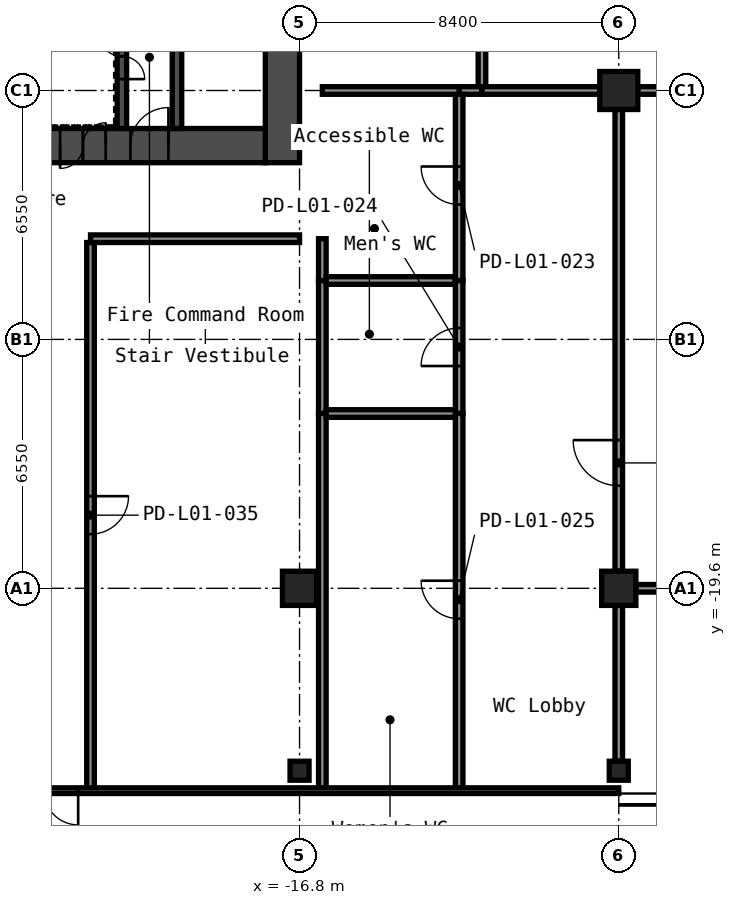
"""IFC4 building model, lengths in metres.
Left out: names, types, materials, properties, quantities, classifications, styles, units other than length and angle.
Written with IfcOpenShell. Run it as: python <this file> out.ifc"""

import sys

from ifc_helpers import new_model, si_unit, direction, frame, frame_2d, origin, origin_2d, place, context, subcontext, project, spatial, rectangle, hollow_rectangle, extrude, element, fill, save


model = new_model("IFC4")
c1 = context("Model", 3, precision=1e-05, world=origin(), true_north=direction((0.0, 1.0)))
c2 = subcontext(c1, "Body", "Model", "MODEL_VIEW")
j1 = project(units=[si_unit("LENGTHUNIT", "METRE"), si_unit("PLANEANGLEUNIT", "RADIAN")], contexts=[c1])
p1 = place(None, origin())
s1 = spatial("IfcSite", under=j1, at=p1, CompositionType="ELEMENT")
p2 = place(p1, origin())
s2 = spatial("IfcBuilding", under=s1, at=p2, CompositionType="ELEMENT")
p3 = place(p2, origin())
s3 = spatial("IfcBuildingStorey", under=s2, at=p3, CompositionType="ELEMENT", Elevation=0.0)
for number, where, z_axis, x_axis in (
    (1, (-16.8, -19.6, -0.3), (0.0, 0.0, 1.0), (1.0, 0.0, 0.0)),
    (2, (-8.4, -19.6, -0.3), (0.0, 0.0, 1.0), (1.0, 0.0, 0.0)),
):
    element("IfcColumn", number, at=place(p3, frame(where, z_axis=z_axis, x_axis=x_axis)), inside=s3, PredefinedType="COLUMN", context=c2, shape_type="SweptSolid", body=[
        extrude(hollow_rectangle(XDim=0.9, YDim=0.9, WallThickness=0.036, at=origin_2d()), origin(), (0.0, 0.0, 1.0), 8.9),
    ])
p4 = place(p3, frame((-8.4, -6.5, -0.3), z_axis=(0.0, 0.0, 1.0), x_axis=(1.0, 0.0, 0.0)))
e3 = element("IfcColumn", 3, at=p4, inside=s3, PredefinedType="COLUMN", context=c2, shape_type="SweptSolid", body=[
    extrude(hollow_rectangle(XDim=1.0, YDim=1.0, WallThickness=0.04, at=origin_2d()), origin(), (0.0, 0.0, 1.0), 8.9),
])
for number, where, z_axis, x_axis in (
    (4, (-16.8, -24.4, -0.3), (0.0, 0.0, 1.0), (1.0, 0.0, 0.0)),
    (5, (-8.4, -24.4, -0.3), (0.0, 0.0, 1.0), (1.0, 0.0, 0.0)),
):
    element("IfcColumn", number, at=place(p3, frame(where, z_axis=z_axis, x_axis=x_axis)), inside=s3, PredefinedType="COLUMN", context=c2, shape_type="SweptSolid", body=[
        extrude(hollow_rectangle(XDim=0.5, YDim=0.5, WallThickness=0.019, InnerFilletRadius=0.029, OuterFilletRadius=0.048, at=origin_2d()), origin(), (0.0, 0.0, 1.0), 8.9),
    ])
p5 = place(p3, frame((-17.25, -8.4, 0.0), z_axis=(0.0, 0.0, 1.0), x_axis=(0.0, 1.0, 0.0)))
e6 = element("IfcWall", 6, at=p5, inside=s3, PredefinedType="SHEAR", context=c2, shape_type="SweptSolid", body=[
    extrude(rectangle(XDim=16.8, YDim=0.9, at=frame_2d((8.4, 0.0))), origin(), (0.0, 0.0, 1.0), 8.6),
])
p6 = place(p5, frame((3.4, 0.0, 0.0)))
e7 = element("IfcOpeningElement", 7, at=p6, cuts=e6, PredefinedType="OPENING", context=c2, shape_type="SweptSolid", body=[
    extrude(rectangle(XDim=1.6, YDim=2.1, at=frame_2d((0.8, 1.05))), frame((0.0, 0.46, 0.0), z_axis=(0.0, -1.0, 0.0), x_axis=(1.0, 0.0, 0.0)), (0.0, 0.0, 1.0), 0.92),
])
p7 = place(p5, frame((9.6, 0.0, 0.0)))
e8 = element("IfcOpeningElement", 8, at=p7, cuts=e6, PredefinedType="OPENING", context=c2, shape_type="SweptSolid", body=[
    extrude(rectangle(XDim=1.6, YDim=2.1, at=frame_2d((0.8, 1.05))), frame((0.0, 0.46, 0.0), z_axis=(0.0, -1.0, 0.0), x_axis=(1.0, 0.0, 0.0)), (0.0, 0.0, 1.0), 0.92),
])
p8 = place(p5, frame((11.8, 0.0, 0.0)))
e9 = element("IfcOpeningElement", 9, at=p8, cuts=e6, PredefinedType="OPENING", context=c2, shape_type="SweptSolid", body=[
    extrude(rectangle(XDim=1.6, YDim=2.1, at=frame_2d((0.8, 1.05))), frame((0.0, 0.46, 0.0), z_axis=(0.0, -1.0, 0.0), x_axis=(1.0, 0.0, 0.0)), (0.0, 0.0, 1.0), 0.92),
])
p9 = place(p3, frame((-32.7, -7.95, 0.0), z_axis=(0.0, 0.0, 1.0), x_axis=(1.0, 0.0, 0.0)))
e10 = element("IfcWall", 10, at=p9, inside=s3, PredefinedType="SHEAR", context=c2, shape_type="SweptSolid", body=[
    extrude(rectangle(XDim=15.0, YDim=0.9, at=frame_2d((7.5, 0.0))), origin(), (0.0, 0.0, 1.0), 8.6),
])
p10 = place(p9, frame((11.45, 0.0, 0.0)))
e11 = element("IfcOpeningElement", 11, at=p10, cuts=e10, PredefinedType="OPENING", context=c2, shape_type="SweptSolid", body=[
    extrude(rectangle(XDim=1.0, YDim=2.1, at=frame_2d((0.5, 1.05))), frame((0.0, 0.46, 0.0), z_axis=(0.0, -1.0, 0.0), x_axis=(1.0, 0.0, 0.0)), (0.0, 0.0, 1.0), 0.92),
])
p11 = place(p9, frame((9.6, 0.0, 0.0)))
e12 = element("IfcOpeningElement", 12, at=p11, cuts=e10, PredefinedType="OPENING", context=c2, shape_type="SweptSolid", body=[
    extrude(rectangle(XDim=1.2, YDim=2.1, at=frame_2d((0.6, 1.05))), frame((0.0, 0.46, 0.0), z_axis=(0.0, -1.0, 0.0), x_axis=(1.0, 0.0, 0.0)), (0.0, 0.0, 1.0), 0.92),
])
p12 = place(p3, frame((-20.025, -7.5, 0.0), z_axis=(0.0, 0.0, 1.0), x_axis=(0.0, 1.0, 0.0)))
e13 = element("IfcWall", 13, at=p12, inside=s3, PredefinedType="SHEAR", context=c2, shape_type="SweptSolid", body=[
    extrude(rectangle(XDim=6.3, YDim=0.25, at=frame_2d((3.15, 0.0))), origin(), (0.0, 0.0, 1.0), 8.6),
])
p13 = place(p12, frame((2.4, 0.0, 0.0)))
e14 = element("IfcOpeningElement", 14, at=p13, cuts=e13, PredefinedType="OPENING", context=c2, shape_type="SweptSolid", body=[
    extrude(rectangle(XDim=1.0, YDim=2.1, at=frame_2d((0.5, 1.05))), frame((0.0, 0.135, 0.0), z_axis=(0.0, -1.0, 0.0), x_axis=(1.0, 0.0, 0.0)), (0.0, 0.0, 1.0), 0.27),
])
p14 = place(p3, frame((-21.475, -7.5, 0.0), z_axis=(0.0, 0.0, 1.0), x_axis=(0.0, 1.0, 0.0)))
e15 = element("IfcWall", 15, at=p14, inside=s3, PredefinedType="SHEAR", context=c2, shape_type="SweptSolid", body=[
    extrude(rectangle(XDim=3.75, YDim=0.25, at=frame_2d((1.875, 0.0))), origin(), (0.0, 0.0, 1.0), 8.6),
])
p15 = place(p14, frame((1.3, 0.0, 0.0)))
e16 = element("IfcOpeningElement", 16, at=p15, cuts=e15, PredefinedType="OPENING", context=c2, shape_type="SweptSolid", body=[
    extrude(rectangle(XDim=1.2, YDim=2.1, at=frame_2d((0.6, 1.05))), frame((0.0, 0.135, 0.0), z_axis=(0.0, -1.0, 0.0), x_axis=(1.0, 0.0, 0.0)), (0.0, 0.0, 1.0), 0.27),
])
p16 = place(p3, frame((-16.2, -11.5, 0.0), z_axis=(0.0, 0.0, 1.0), x_axis=(0.0, -1.0, 0.0)))
e17 = element("IfcWall", 17, at=p16, inside=s3, PredefinedType="PARTITIONING", context=c2, shape_type="SweptSolid", body=[
    extrude(rectangle(XDim=3.5, YDim=0.2, at=frame_2d((1.75, 0.0))), origin(), (0.0, 0.0, 1.0), 8.6),
])
p17 = place(p3, frame((-16.2, -10.4, 0.0), z_axis=(0.0, 0.0, 1.0), x_axis=(0.0, -1.0, 0.0)))
e18 = element("IfcWall", 18, at=p17, inside=s3, PredefinedType="PARTITIONING", context=c2, shape_type="SweptSolid", body=[
    extrude(rectangle(XDim=1.1, YDim=0.2, at=frame_2d((0.55, 0.0))), origin(), (0.0, 0.0, 1.0), 8.6),
])
p18 = place(p3, frame((-16.2, -15.0, 0.0), z_axis=(0.0, 0.0, 1.0), x_axis=(0.0, -1.0, 0.0)))
e19 = element("IfcWall", 19, at=p18, inside=s3, PredefinedType="PARTITIONING", context=c2, shape_type="SweptSolid", body=[
    extrude(rectangle(XDim=9.85, YDim=0.2, at=frame_2d((4.925, 0.0))), origin(), (0.0, 0.0, 1.0), 8.6),
])
p19 = place(p3, frame((-12.0, 6.4, 0.0), z_axis=(0.0, 0.0, 1.0), x_axis=(0.0, -1.0, 0.0)))
e20 = element("IfcWall", 20, at=p19, inside=s3, PredefinedType="PARTITIONING", context=c2, shape_type="SweptSolid", body=[
    extrude(rectangle(XDim=12.8, YDim=0.2, at=frame_2d((6.4, 0.0))), origin(), (0.0, 0.0, 1.0), 8.6),
])
p20 = place(p19, frame((5.2, 0.0, 0.0)))
e21 = element("IfcOpeningElement", 21, at=p20, cuts=e20, PredefinedType="OPENING", context=c2, shape_type="SweptSolid", body=[
    extrude(rectangle(XDim=2.4, YDim=2.1, at=frame_2d((1.2, 1.05))), frame((0.0, 0.11, 0.0), z_axis=(0.0, -1.0, 0.0), x_axis=(1.0, 0.0, 0.0)), (0.0, 0.0, 1.0), 0.22),
])
p21 = place(p3, frame((-7.9, -6.5, 0.0), z_axis=(0.0, 0.0, 1.0), x_axis=(1.0, 0.0, 0.0)))
e22 = element("IfcWall", 22, at=p21, inside=s3, PredefinedType="PARTITIONING", context=c2, shape_type="SweptSolid", body=[
    extrude(rectangle(XDim=7.4, YDim=0.2, at=frame_2d((3.7, 0.0))), origin(), (0.0, 0.0, 1.0), 8.6),
])
p22 = place(p21, frame((2.5, 0.0, 0.0)))
e23 = element("IfcOpeningElement", 23, at=p22, cuts=e22, PredefinedType="OPENING", context=c2, shape_type="SweptSolid", body=[
    extrude(rectangle(XDim=2.4, YDim=2.1, at=frame_2d((1.2, 1.05))), frame((0.0, 0.11, 0.0), z_axis=(0.0, -1.0, 0.0), x_axis=(1.0, 0.0, 0.0)), (0.0, 0.0, 1.0), 0.22),
])
p23 = place(p3, frame((-0.45, -19.6, 0.0), z_axis=(0.0, 0.0, 1.0), x_axis=(-1.0, 0.0, 0.0)))
e24 = element("IfcWall", 24, at=p23, inside=s3, PredefinedType="PARTITIONING", context=c2, shape_type="SweptSolid", body=[
    extrude(rectangle(XDim=7.5, YDim=0.2, at=frame_2d((3.75, 0.0))), origin(), (0.0, 0.0, 1.0), 8.6),
])
p24 = place(p23, frame((2.55, 0.0, 0.0)))
e25 = element("IfcOpeningElement", 25, at=p24, cuts=e24, PredefinedType="OPENING", context=c2, shape_type="SweptSolid", body=[
    extrude(rectangle(XDim=2.4, YDim=2.1, at=frame_2d((1.2, 1.05))), frame((0.0, 0.11, 0.0), z_axis=(0.0, -1.0, 0.0), x_axis=(1.0, 0.0, 0.0)), (0.0, 0.0, 1.0), 0.22),
])
p25 = place(p3, frame((-16.1, -11.5, 0.0), z_axis=(0.0, 0.0, 1.0), x_axis=(1.0, 0.0, 0.0)))
e26 = element("IfcWall", 26, at=p25, inside=s3, PredefinedType="PARTITIONING", context=c2, shape_type="SweptSolid", body=[
    extrude(rectangle(XDim=3.4, YDim=0.2, at=frame_2d((1.7, 0.0))), origin(), (0.0, 0.0, 1.0), 8.6),
])
p26 = place(p3, frame((-12.6, -6.5, 0.0), z_axis=(0.0, 0.0, 1.0), x_axis=(1.0, 0.0, 0.0)))
e27 = element("IfcWall", 27, at=p26, inside=s3, PredefinedType="PARTITIONING", context=c2, shape_type="SweptSolid", body=[
    extrude(rectangle(XDim=0.6, YDim=0.2, at=frame_2d((0.3, 0.0))), origin(), (0.0, 0.0, 1.0), 8.6),
])
p27 = place(p3, frame((-12.0, -6.5, 0.0), z_axis=(0.0, 0.0, 1.0), x_axis=(1.0, 0.0, 0.0)))
e28 = element("IfcWall", 28, at=p27, inside=s3, PredefinedType="PARTITIONING", context=c2, shape_type="SweptSolid", body=[
    extrude(rectangle(XDim=3.1, YDim=0.2, at=frame_2d((1.55, 0.0))), origin(), (0.0, 0.0, 1.0), 8.6),
])
p28 = place(p3, frame((-8.4, -7.0, 0.0), z_axis=(0.0, 0.0, 1.0), x_axis=(0.0, -1.0, 0.0)))
e29 = element("IfcWall", 29, at=p28, inside=s3, PredefinedType="PARTITIONING", context=c2, shape_type="SweptSolid", body=[
    extrude(rectangle(XDim=12.15, YDim=0.2, at=frame_2d((6.075, 0.0))), origin(), (0.0, 0.0, 1.0), 8.6),
])
p29 = place(p28, frame((8.7, 0.0, 0.0)))
e30 = element("IfcOpeningElement", 30, at=p29, cuts=e29, PredefinedType="OPENING", context=c2, shape_type="SweptSolid", body=[
    extrude(rectangle(XDim=1.2, YDim=2.1, at=frame_2d((0.6, 1.05))), frame((0.0, 0.11, 0.0), z_axis=(0.0, -1.0, 0.0), x_axis=(1.0, 0.0, 0.0)), (0.0, 0.0, 1.0), 0.22),
])
p30 = place(p3, frame((-8.4, -20.05, 0.0), z_axis=(0.0, 0.0, 1.0), x_axis=(0.0, -1.0, 0.0)))
e31 = element("IfcWall", 31, at=p30, inside=s3, PredefinedType="PARTITIONING", context=c2, shape_type="SweptSolid", body=[
    extrude(rectangle(XDim=4.1, YDim=0.2, at=frame_2d((2.05, 0.0))), origin(), (0.0, 0.0, 1.0), 8.6),
])
p31 = place(p3, frame((-12.6, -15.0, 0.0), z_axis=(0.0, 0.0, 1.0), x_axis=(0.0, 1.0, 0.0)))
e32 = element("IfcWall", 32, at=p31, inside=s3, PredefinedType="PARTITIONING", context=c2, shape_type="SweptSolid", body=[
    extrude(rectangle(XDim=3.5, YDim=0.2, at=frame_2d((1.75, 0.0))), origin(), (0.0, 0.0, 1.0), 8.6),
])
p32 = place(p31, frame((1.25, 0.0, 0.0)))
e33 = element("IfcOpeningElement", 33, at=p32, cuts=e32, PredefinedType="OPENING", context=c2, shape_type="SweptSolid", body=[
    extrude(rectangle(XDim=1.0, YDim=2.1, at=frame_2d((0.5, 1.05))), frame((0.0, 0.11, 0.0), z_axis=(0.0, -1.0, 0.0), x_axis=(1.0, 0.0, 0.0)), (0.0, 0.0, 1.0), 0.22),
])
p33 = place(p3, frame((-12.6, -11.5, 0.0), z_axis=(0.0, 0.0, 1.0), x_axis=(0.0, 1.0, 0.0)))
e34 = element("IfcWall", 34, at=p33, inside=s3, PredefinedType="PARTITIONING", context=c2, shape_type="SweptSolid", body=[
    extrude(rectangle(XDim=4.9, YDim=0.2, at=frame_2d((2.45, 0.0))), origin(), (0.0, 0.0, 1.0), 8.6),
])
p34 = place(p33, frame((2.0, 0.0, 0.0)))
e35 = element("IfcOpeningElement", 35, at=p34, cuts=e34, PredefinedType="OPENING", context=c2, shape_type="SweptSolid", body=[
    extrude(rectangle(XDim=1.0, YDim=2.1, at=frame_2d((0.5, 1.05))), frame((0.0, 0.11, 0.0), z_axis=(0.0, -1.0, 0.0), x_axis=(1.0, 0.0, 0.0)), (0.0, 0.0, 1.0), 0.22),
])
p35 = place(p3, frame((-12.6, -24.85, 0.0), z_axis=(0.0, 0.0, 1.0), x_axis=(0.0, 1.0, 0.0)))
e36 = element("IfcWall", 36, at=p35, inside=s3, PredefinedType="PARTITIONING", context=c2, shape_type="SweptSolid", body=[
    extrude(rectangle(XDim=9.85, YDim=0.2, at=frame_2d((4.925, 0.0))), origin(), (0.0, 0.0, 1.0), 8.6),
])
p36 = place(p35, frame((4.45, 0.0, 0.0)))
e37 = element("IfcOpeningElement", 37, at=p36, cuts=e36, PredefinedType="OPENING", context=c2, shape_type="SweptSolid", body=[
    extrude(rectangle(XDim=1.0, YDim=2.1, at=frame_2d((0.5, 1.05))), frame((0.0, 0.11, 0.0), z_axis=(0.0, -1.0, 0.0), x_axis=(1.0, 0.0, 0.0)), (0.0, 0.0, 1.0), 0.22),
])
p37 = place(p3, frame((-16.2, -6.5, 0.0), z_axis=(0.0, 0.0, 1.0), x_axis=(1.0, 0.0, 0.0)))
e38 = element("IfcWall", 38, at=p37, inside=s3, PredefinedType="PARTITIONING", context=c2, shape_type="SweptSolid", body=[
    extrude(rectangle(XDim=3.6, YDim=0.2, at=frame_2d((1.8, 0.0))), origin(), (0.0, 0.0, 1.0), 8.6),
])
p38 = place(p3, frame((-16.1, -15.0, 0.0), z_axis=(0.0, 0.0, 1.0), x_axis=(1.0, 0.0, 0.0)))
e39 = element("IfcWall", 39, at=p38, inside=s3, PredefinedType="PARTITIONING", context=c2, shape_type="SweptSolid", body=[
    extrude(rectangle(XDim=3.4, YDim=0.2, at=frame_2d((1.7, 0.0))), origin(), (0.0, 0.0, 1.0), 8.6),
])
p39 = place(p3, frame((-22.3, -10.5, 0.0), z_axis=(0.0, 0.0, 1.0), x_axis=(0.0, -1.0, 0.0)))
e40 = element("IfcWall", 40, at=p39, inside=s3, PredefinedType="PARTITIONING", context=c2, shape_type="SweptSolid", body=[
    extrude(rectangle(XDim=14.35, YDim=0.2, at=frame_2d((7.175, 0.0))), origin(), (0.0, 0.0, 1.0), 8.6),
])
p40 = place(p39, frame((6.675, 0.0, 0.0)))
e41 = element("IfcOpeningElement", 41, at=p40, cuts=e40, PredefinedType="OPENING", context=c2, shape_type="SweptSolid", body=[
    extrude(rectangle(XDim=1.0, YDim=2.1, at=frame_2d((0.5, 1.05))), frame((0.0, 0.11, 0.0), z_axis=(0.0, -1.0, 0.0), x_axis=(1.0, 0.0, 0.0)), (0.0, 0.0, 1.0), 0.22),
])
p41 = place(p3, frame((-16.8, -10.4, 0.0), z_axis=(0.0, 0.0, 1.0), x_axis=(-1.0, 0.0, 0.0)))
e42 = element("IfcWall", 42, at=p41, inside=s3, PredefinedType="PARTITIONING", context=c2, shape_type="SweptSolid", body=[
    extrude(rectangle(XDim=5.5, YDim=0.2, at=frame_2d((2.75, 0.0))), origin(), (0.0, 0.0, 1.0), 8.6),
])
p42 = place(p3, frame((-8.4, -24.925, 0.0), z_axis=(0.0, 0.0, 1.0), x_axis=(-1.0, 0.0, 0.0)))
e43 = element("IfcWall", 43, at=p42, inside=s3, PredefinedType="STANDARD", context=c2, shape_type="SweptSolid", body=[
    extrude(rectangle(XDim=43.58, YDim=0.15, at=frame_2d((21.79, 0.0))), origin(), (0.0, 0.0, 1.0), 8.6),
])
p43 = place(p42, frame((33.9, 0.0, 0.0)))
e44 = element("IfcOpeningElement", 44, at=p43, cuts=e43, PredefinedType="OPENING", context=c2, shape_type="SweptSolid", body=[
    extrude(rectangle(XDim=1.4, YDim=2.1, at=frame_2d((0.7, 1.05))), frame((0.0, 0.085, 0.0), z_axis=(0.0, -1.0, 0.0), x_axis=(1.0, 0.0, 0.0)), (0.0, 0.0, 1.0), 0.17),
])
p44 = place(p42, frame((14.225, 0.0, 0.0)))
e45 = element("IfcOpeningElement", 45, at=p44, cuts=e43, PredefinedType="OPENING", context=c2, shape_type="SweptSolid", body=[
    extrude(rectangle(XDim=1.8, YDim=2.1, at=frame_2d((0.9, 1.05))), frame((0.0, 0.085, 0.0), z_axis=(0.0, -1.0, 0.0), x_axis=(1.0, 0.0, 0.0)), (0.0, 0.0, 1.0), 0.17),
])
p45 = place(p10, origin())
e46 = element("IfcDoor", 46, at=p45, inside=s3, OperationType="SINGLE_SWING_LEFT", PredefinedType="DOOR", context=c2, shape_type="SweptSolid", body=[
    extrude(rectangle(XDim=1.0, YDim=2.1, at=frame_2d((0.5, 1.05))), frame((0.0, 0.025, 0.0), z_axis=(0.0, -1.0, 0.0), x_axis=(1.0, 0.0, 0.0)), (0.0, 0.0, 1.0), 0.05),
])
fill(e11, e46)
p46 = place(p11, frame((1.2, 0.0, 0.0), z_axis=(0.0, 0.0, 1.0), x_axis=(-1.0, 0.0, 0.0)))
e47 = element("IfcDoor", 47, at=p46, inside=s3, OperationType="DOUBLE_DOOR_SINGLE_SWING", PredefinedType="DOOR", context=c2, shape_type="SweptSolid", body=[
    extrude(rectangle(XDim=1.2, YDim=2.1, at=frame_2d((0.6, 1.05))), frame((0.0, 0.025, 0.0), z_axis=(0.0, -1.0, 0.0), x_axis=(1.0, 0.0, 0.0)), (0.0, 0.0, 1.0), 0.05),
])
fill(e12, e47)
p47 = place(p15, origin())
e48 = element("IfcDoor", 48, at=p47, inside=s3, OperationType="DOUBLE_DOOR_SINGLE_SWING", PredefinedType="DOOR", context=c2, shape_type="SweptSolid", body=[
    extrude(rectangle(XDim=1.2, YDim=2.1, at=frame_2d((0.6, 1.05))), frame((0.0, 0.025, 0.0), z_axis=(0.0, -1.0, 0.0), x_axis=(1.0, 0.0, 0.0)), (0.0, 0.0, 1.0), 0.05),
])
fill(e16, e48)
p48 = place(p29, origin())
e49 = element("IfcDoor", 49, at=p48, inside=s3, OperationType="SINGLE_SWING_LEFT", PredefinedType="DOOR", context=c2, shape_type="SweptSolid", body=[
    extrude(rectangle(XDim=1.2, YDim=2.1, at=frame_2d((0.6, 1.05))), frame((0.0, 0.025, 0.0), z_axis=(0.0, -1.0, 0.0), x_axis=(1.0, 0.0, 0.0)), (0.0, 0.0, 1.0), 0.05),
])
fill(e30, e49)
p49 = place(p34, origin())
e50 = element("IfcDoor", 50, at=p49, inside=s3, OperationType="SINGLE_SWING_LEFT", PredefinedType="DOOR", context=c2, shape_type="SweptSolid", body=[
    extrude(rectangle(XDim=1.0, YDim=2.1, at=frame_2d((0.5, 1.05))), frame((0.0, 0.025, 0.0), z_axis=(0.0, -1.0, 0.0), x_axis=(1.0, 0.0, 0.0)), (0.0, 0.0, 1.0), 0.05),
])
fill(e35, e50)
p50 = place(p32, origin())
e51 = element("IfcDoor", 51, at=p50, inside=s3, OperationType="SINGLE_SWING_RIGHT", PredefinedType="DOOR", context=c2, shape_type="SweptSolid", body=[
    extrude(rectangle(XDim=1.0, YDim=2.1, at=frame_2d((0.5, 1.05))), frame((0.0, 0.025, 0.0), z_axis=(0.0, -1.0, 0.0), x_axis=(1.0, 0.0, 0.0)), (0.0, 0.0, 1.0), 0.05),
])
fill(e33, e51)
p51 = place(p36, origin())
e52 = element("IfcDoor", 52, at=p51, inside=s3, OperationType="SINGLE_SWING_LEFT", PredefinedType="DOOR", context=c2, shape_type="SweptSolid", body=[
    extrude(rectangle(XDim=1.0, YDim=2.1, at=frame_2d((0.5, 1.05))), frame((0.0, 0.025, 0.0), z_axis=(0.0, -1.0, 0.0), x_axis=(1.0, 0.0, 0.0)), (0.0, 0.0, 1.0), 0.05),
])
fill(e37, e52)
p52 = place(p40, origin())
e53 = element("IfcDoor", 53, at=p52, inside=s3, OperationType="SINGLE_SWING_RIGHT", PredefinedType="DOOR", context=c2, shape_type="SweptSolid", body=[
    extrude(rectangle(XDim=1.0, YDim=2.1, at=frame_2d((0.5, 1.05))), frame((0.0, 0.025, 0.0), z_axis=(0.0, -1.0, 0.0), x_axis=(1.0, 0.0, 0.0)), (0.0, 0.0, 1.0), 0.05),
])
fill(e41, e53)
p53 = place(p44, origin())
e54 = element("IfcDoor", 54, at=p53, inside=s3, OperationType="DOUBLE_DOOR_SINGLE_SWING", PredefinedType="DOOR", context=c2, shape_type="SweptSolid", body=[
    extrude(rectangle(XDim=1.8, YDim=2.1, at=frame_2d((0.9, 1.05))), frame((0.0, 0.025, 0.0), z_axis=(0.0, -1.0, 0.0), x_axis=(1.0, 0.0, 0.0)), (0.0, 0.0, 1.0), 0.05),
])
fill(e45, e54)
save(model, sys.argv[1])
